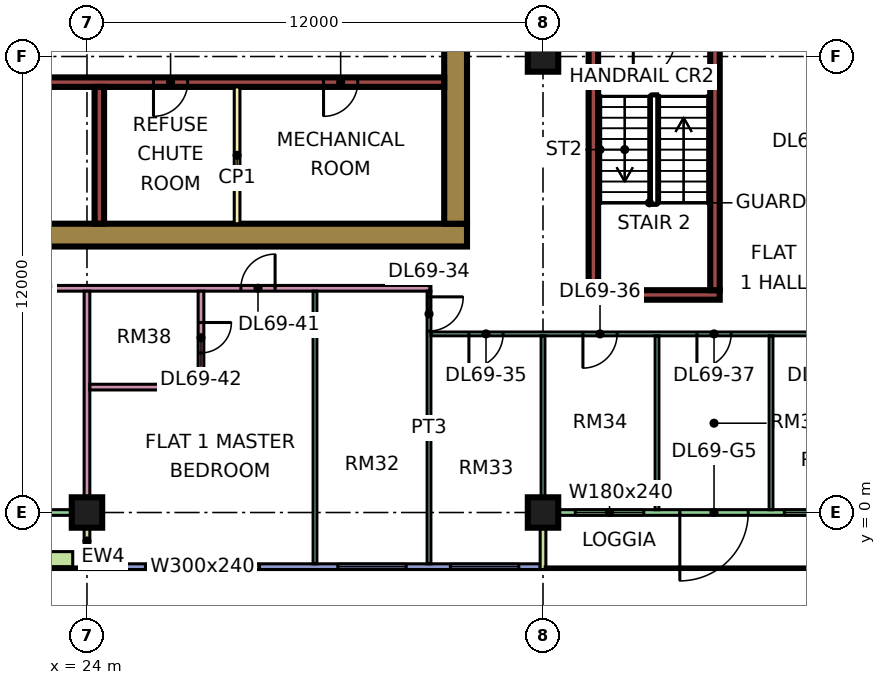
"""IFC4 building model, lengths in metres.
Left out: names, types, materials, properties, quantities, classifications, styles, units other than length and angle.
Written with IfcOpenShell. Run it as: python <this file> out.ifc"""

import sys

from ifc_helpers import new_model, si_unit, direction, frame, frame_2d, origin, origin_2d, place, context, subcontext, project, spatial, rectangle, extrude, element, fill, save


model = new_model("IFC4")
c1 = context("Model", 3, precision=1e-05, world=origin(), true_north=direction((0.0, 1.0)))
c2 = subcontext(c1, "Body", "Model", "MODEL_VIEW")
j1 = project(units=[si_unit("LENGTHUNIT", "METRE"), si_unit("PLANEANGLEUNIT", "RADIAN")], contexts=[c1])
p1 = place(None, origin())
s1 = spatial("IfcSite", under=j1, at=p1, CompositionType="ELEMENT")
p2 = place(p1, origin())
s2 = spatial("IfcBuilding", under=s1, at=p2, CompositionType="ELEMENT")
p3 = place(p2, frame((0.0, 0.0, 295.9)))
s3 = spatial("IfcBuildingStorey", under=s2, at=p3, CompositionType="ELEMENT", Elevation=295.9)
for number, where, z_axis, x_axis in (
    (1, (24.0, 0.0, 0.0), (0.0, 0.0, 1.0), (1.0, 0.0, 0.0)),
    (2, (36.0, 0.0, 0.0), (0.0, 0.0, 1.0), (1.0, 0.0, 0.0)),
    (3, (36.0, 12.0, 0.0), (0.0, 0.0, 1.0), (1.0, 0.0, 0.0)),
):
    element("IfcColumn", number, at=place(p3, frame(where, z_axis=z_axis, x_axis=x_axis)), inside=s3, PredefinedType="COLUMN", context=c2, shape_type="SweptSolid", body=[
        extrude(rectangle(XDim=0.8, YDim=0.8, at=origin_2d()), origin(), (0.0, 0.0, 1.0), 3.75),
    ])
p4 = place(p3, frame((9.0, 7.3, 0.0), z_axis=(0.0, 0.0, 1.0), x_axis=(1.0, 0.0, 0.0)))
e4 = element("IfcWall", 4, at=p4, inside=s3, PredefinedType="SHEAR", context=c2, shape_type="SweptSolid", body=[
    extrude(rectangle(XDim=25.0, YDim=0.6, at=frame_2d((12.5, 0.0))), origin(), (0.0, 0.0, 1.0), 3.75),
])
p5 = place(p3, frame((33.7, 7.6, 0.0), z_axis=(0.0, 0.0, 1.0), x_axis=(0.0, 1.0, 0.0)))
e5 = element("IfcWall", 5, at=p5, inside=s3, PredefinedType="SHEAR", context=c2, shape_type="SweptSolid", body=[
    extrude(rectangle(XDim=11.8, YDim=0.6, at=frame_2d((5.9, 0.0))), origin(), (0.0, 0.0, 1.0), 3.75),
])
p6 = place(p5, frame((5.6, 0.0, 0.0)))
e6 = element("IfcOpeningElement", 6, at=p6, cuts=e5, PredefinedType="OPENING", context=c2, shape_type="SweptSolid", body=[
    extrude(rectangle(XDim=1.8, YDim=2.4, at=frame_2d((0.9, 1.2))), frame((0.0, 0.31, 0.0), z_axis=(0.0, -1.0, 0.0), x_axis=(1.0, 0.0, 0.0)), (0.0, 0.0, 1.0), 0.62),
])
p7 = place(p3, frame((13.45, 11.325, 0.0), z_axis=(0.0, 0.0, 1.0), x_axis=(1.0, 0.0, 0.0)))
e7 = element("IfcWall", 7, at=p7, inside=s3, PredefinedType="SHEAR", context=c2, shape_type="SweptSolid", body=[
    extrude(rectangle(XDim=19.95, YDim=0.25, at=frame_2d((9.975, 0.0))), origin(), (0.0, 0.0, 1.0), 3.75),
])
p8 = place(p7, frame((4.925, 0.0, 0.0)))
e8 = element("IfcOpeningElement", 8, at=p8, cuts=e7, PredefinedType="OPENING", context=c2, shape_type="SweptSolid", body=[
    extrude(rectangle(XDim=0.9, YDim=2.1, at=frame_2d((0.45, 1.05))), frame((0.0, 0.135, 0.0), z_axis=(0.0, -1.0, 0.0), x_axis=(1.0, 0.0, 0.0)), (0.0, 0.0, 1.0), 0.27),
])
p9 = place(p7, frame((12.3, 0.0, 0.0)))
e9 = element("IfcOpeningElement", 9, at=p9, cuts=e7, PredefinedType="OPENING", context=c2, shape_type="SweptSolid", body=[
    extrude(rectangle(XDim=0.9, YDim=2.1, at=frame_2d((0.45, 1.05))), frame((0.0, 0.135, 0.0), z_axis=(0.0, -1.0, 0.0), x_axis=(1.0, 0.0, 0.0)), (0.0, 0.0, 1.0), 0.27),
])
p10 = place(p7, frame((16.775, 0.0, 0.0)))
e10 = element("IfcOpeningElement", 10, at=p10, cuts=e7, PredefinedType="OPENING", context=c2, shape_type="SweptSolid", body=[
    extrude(rectangle(XDim=0.9, YDim=2.1, at=frame_2d((0.45, 1.05))), frame((0.0, 0.135, 0.0), z_axis=(0.0, -1.0, 0.0), x_axis=(1.0, 0.0, 0.0)), (0.0, 0.0, 1.0), 0.27),
])
p11 = place(p3, frame((24.325, 7.6, 0.0), z_axis=(0.0, 0.0, 1.0), x_axis=(0.0, 1.0, 0.0)))
e11 = element("IfcWall", 11, at=p11, inside=s3, PredefinedType="SHEAR", context=c2, shape_type="SweptSolid", body=[
    extrude(rectangle(XDim=3.6, YDim=0.25, at=frame_2d((1.8, 0.0))), origin(), (0.0, 0.0, 1.0), 3.75),
])
p12 = place(p3, frame((37.2, 5.725, 0.0), z_axis=(0.0, 0.0, 1.0), x_axis=(1.0, 0.0, 0.0)))
e12 = element("IfcWall", 12, at=p12, inside=s3, PredefinedType="SHEAR", context=c2, shape_type="SweptSolid", body=[
    extrude(rectangle(XDim=3.45, YDim=0.25, at=frame_2d((1.725, 0.0))), origin(), (0.0, 0.0, 1.0), 3.75),
])
for number, where, z_axis, x_axis in (
    (13, (37.325, 5.85, 0.0), (0.0, 0.0, 1.0), (0.0, 1.0, 0.0)),
    (14, (40.525, 5.85, 0.0), (0.0, 0.0, 1.0), (0.0, 1.0, 0.0)),
):
    element("IfcWall", number, at=place(p3, frame(where, z_axis=z_axis, x_axis=x_axis)), inside=s3, PredefinedType="SHEAR", context=c2, shape_type="SweptSolid", body=[
        extrude(rectangle(XDim=6.5, YDim=0.25, at=frame_2d((3.25, 0.0))), origin(), (0.0, 0.0, 1.0), 3.75),
    ])
p13 = place(p3, frame((12.575, 0.0, 0.0), z_axis=(0.0, 0.0, 1.0), x_axis=(1.0, 0.0, 0.0)))
e15 = element("IfcWall", 15, at=p13, inside=s3, PredefinedType="SOLIDWALL", context=c2, shape_type="SweptSolid", body=[
    extrude(rectangle(XDim=11.35, YDim=0.15, at=frame_2d((5.675, 0.0))), origin(), (0.0, 0.0, 1.0), 3.35),
])
p14 = place(p13, frame((0.613, 0.0, 0.0)))
e16 = element("IfcOpeningElement", 16, at=p14, cuts=e15, PredefinedType="OPENING", context=c2, shape_type="SweptSolid", body=[
    extrude(rectangle(XDim=1.2, YDim=2.4, at=frame_2d((0.6, 1.2))), frame((0.0, 0.085, 0.0), z_axis=(0.0, -1.0, 0.0), x_axis=(1.0, 0.0, 0.0)), (0.0, 0.0, 1.0), 0.17),
])
p15 = place(p13, frame((5.175, 0.0, 0.45)))
e17 = element("IfcOpeningElement", 17, at=p15, cuts=e15, PredefinedType="OPENING", context=c2, shape_type="SweptSolid", body=[
    extrude(rectangle(XDim=3.0, YDim=2.4, at=frame_2d((1.5, 1.2))), frame((0.0, 0.085, 0.0), z_axis=(0.0, -1.0, 0.0), x_axis=(1.0, 0.0, 0.0)), (0.0, 0.0, 1.0), 0.17),
])
p16 = place(p3, frame((24.0, -1.5, 0.0), z_axis=(0.0, 0.0, 1.0), x_axis=(0.0, 1.0, 0.0)))
e18 = element("IfcWall", 18, at=p16, inside=s3, PredefinedType="SOLIDWALL", context=c2, shape_type="SweptSolid", body=[
    extrude(rectangle(XDim=1.5, YDim=0.15, at=frame_2d((0.75, 0.0))), origin(), (0.0, 0.0, 1.0), 3.35),
])
p17 = place(p3, frame((24.075, -1.425, 0.0), z_axis=(0.0, 0.0, 1.0), x_axis=(1.0, 0.0, 0.0)))
e19 = element("IfcWall", 19, at=p17, inside=s3, PredefinedType="SOLIDWALL", context=c2, shape_type="SweptSolid", body=[
    extrude(rectangle(XDim=11.85, YDim=0.15, at=frame_2d((5.925, 0.0))), origin(), (0.0, 0.0, 1.0), 3.35),
])
p18 = place(p17, frame((1.462, 0.0, 0.45)))
e20 = element("IfcOpeningElement", 20, at=p18, cuts=e19, PredefinedType="OPENING", context=c2, shape_type="SweptSolid", body=[
    extrude(rectangle(XDim=3.0, YDim=2.4, at=frame_2d((1.5, 1.2))), frame((0.0, 0.085, 0.0), z_axis=(0.0, -1.0, 0.0), x_axis=(1.0, 0.0, 0.0)), (0.0, 0.0, 1.0), 0.17),
])
p19 = place(p17, frame((6.525, 0.0, 0.45)))
e21 = element("IfcOpeningElement", 21, at=p19, cuts=e19, PredefinedType="OPENING", context=c2, shape_type="SweptSolid", body=[
    extrude(rectangle(XDim=1.8, YDim=2.4, at=frame_2d((0.9, 1.2))), frame((0.0, 0.085, 0.0), z_axis=(0.0, -1.0, 0.0), x_axis=(1.0, 0.0, 0.0)), (0.0, 0.0, 1.0), 0.17),
])
p20 = place(p17, frame((9.488, 0.0, 0.45)))
e22 = element("IfcOpeningElement", 22, at=p20, cuts=e19, PredefinedType="OPENING", context=c2, shape_type="SweptSolid", body=[
    extrude(rectangle(XDim=1.8, YDim=2.4, at=frame_2d((0.9, 1.2))), frame((0.0, 0.085, 0.0), z_axis=(0.0, -1.0, 0.0), x_axis=(1.0, 0.0, 0.0)), (0.0, 0.0, 1.0), 0.17),
])
p21 = place(p3, frame((36.075, 0.0, 0.0), z_axis=(0.0, 0.0, 1.0), x_axis=(1.0, 0.0, 0.0)))
e23 = element("IfcWall", 23, at=p21, inside=s3, PredefinedType="SOLIDWALL", context=c2, shape_type="SweptSolid", body=[
    extrude(rectangle(XDim=11.85, YDim=0.15, at=frame_2d((5.925, 0.0))), origin(), (0.0, 0.0, 1.0), 3.35),
])
p22 = place(p21, frame((0.775, 0.0, 0.45)))
e24 = element("IfcOpeningElement", 24, at=p22, cuts=e23, PredefinedType="OPENING", context=c2, shape_type="SweptSolid", body=[
    extrude(rectangle(XDim=1.8, YDim=2.4, at=frame_2d((0.9, 1.2))), frame((0.0, 0.085, 0.0), z_axis=(0.0, -1.0, 0.0), x_axis=(1.0, 0.0, 0.0)), (0.0, 0.0, 1.0), 0.17),
])
p23 = place(p21, frame((3.525, 0.0, 0.0)))
e25 = element("IfcOpeningElement", 25, at=p23, cuts=e23, PredefinedType="OPENING", context=c2, shape_type="SweptSolid", body=[
    extrude(rectangle(XDim=1.8, YDim=2.4, at=frame_2d((0.9, 1.2))), frame((0.0, 0.085, 0.0), z_axis=(0.0, -1.0, 0.0), x_axis=(1.0, 0.0, 0.0)), (0.0, 0.0, 1.0), 0.17),
])
p24 = place(p21, frame((6.275, 0.0, 0.45)))
e26 = element("IfcOpeningElement", 26, at=p24, cuts=e23, PredefinedType="OPENING", context=c2, shape_type="SweptSolid", body=[
    extrude(rectangle(XDim=1.8, YDim=2.4, at=frame_2d((0.9, 1.2))), frame((0.0, 0.085, 0.0), z_axis=(0.0, -1.0, 0.0), x_axis=(1.0, 0.0, 0.0)), (0.0, 0.0, 1.0), 0.17),
])
p25 = place(p21, frame((10.038, 0.0, 0.45)))
e27 = element("IfcOpeningElement", 27, at=p25, cuts=e23, PredefinedType="OPENING", context=c2, shape_type="SweptSolid", body=[
    extrude(rectangle(XDim=1.2, YDim=2.4, at=frame_2d((0.6, 1.2))), frame((0.0, 0.085, 0.0), z_axis=(0.0, -1.0, 0.0), x_axis=(1.0, 0.0, 0.0)), (0.0, 0.0, 1.0), 0.17),
])
p26 = place(p3, frame((36.0, -1.5, 0.0), z_axis=(0.0, 0.0, 1.0), x_axis=(0.0, 1.0, 0.0)))
e28 = element("IfcWall", 28, at=p26, inside=s3, PredefinedType="SOLIDWALL", context=c2, shape_type="SweptSolid", body=[
    extrude(rectangle(XDim=1.5, YDim=0.15, at=frame_2d((0.75, 0.0))), origin(), (0.0, 0.0, 1.0), 3.35),
])
p27 = place(p3, frame((12.875, -1.229, 0.0), z_axis=(0.0, 0.0, 1.0), x_axis=(1.0, 0.0, 0.0)))
e29 = element("IfcWall", 29, at=p27, inside=s3, PredefinedType="SOLIDWALL", context=c2, shape_type="SweptSolid", body=[
    extrude(rectangle(XDim=10.75, YDim=0.4, at=frame_2d((5.375, 0.0))), origin(), (0.0, 0.0, 1.0), 0.7),
])
p28 = place(p3, frame((27.95, 7.6, 0.0), z_axis=(0.0, 0.0, 1.0), x_axis=(0.0, 1.0, 0.0)))
e30 = element("IfcWall", 30, at=p28, inside=s3, PredefinedType="PARTITIONING", context=c2, shape_type="SweptSolid", body=[
    extrude(rectangle(XDim=3.6, YDim=0.15, at=frame_2d((1.8, 0.0))), origin(), (0.0, 0.0, 1.0), 3.35),
])
p29 = place(p3, frame((11.95, 5.9, 0.0), z_axis=(0.0, 0.0, 1.0), x_axis=(1.0, 0.0, 0.0)))
e31 = element("IfcWall", 31, at=p29, inside=s3, PredefinedType="PARTITIONING", context=c2, shape_type="SweptSolid", body=[
    extrude(rectangle(XDim=21.1, YDim=0.15, at=frame_2d((10.55, 0.0))), origin(), (0.0, 0.0, 1.0), 3.35),
])
p30 = place(p29, frame((1.1, 0.0, 0.0)))
e32 = element("IfcOpeningElement", 32, at=p30, cuts=e31, PredefinedType="OPENING", context=c2, shape_type="SweptSolid", body=[
    extrude(rectangle(XDim=0.9, YDim=2.1, at=frame_2d((0.45, 1.05))), frame((0.0, 0.085, 0.0), z_axis=(0.0, -1.0, 0.0), x_axis=(1.0, 0.0, 0.0)), (0.0, 0.0, 1.0), 0.17),
])
p31 = place(p29, frame((16.1, 0.0, 0.0)))
e33 = element("IfcOpeningElement", 33, at=p31, cuts=e31, PredefinedType="OPENING", context=c2, shape_type="SweptSolid", body=[
    extrude(rectangle(XDim=0.9, YDim=2.1, at=frame_2d((0.45, 1.05))), frame((0.0, 0.085, 0.0), z_axis=(0.0, -1.0, 0.0), x_axis=(1.0, 0.0, 0.0)), (0.0, 0.0, 1.0), 0.17),
])
p32 = place(p29, frame((7.1, 0.0, 0.0)))
e34 = element("IfcOpeningElement", 34, at=p32, cuts=e31, PredefinedType="OPENING", context=c2, shape_type="SweptSolid", body=[
    extrude(rectangle(XDim=0.9, YDim=2.1, at=frame_2d((0.45, 1.05))), frame((0.0, 0.085, 0.0), z_axis=(0.0, -1.0, 0.0), x_axis=(1.0, 0.0, 0.0)), (0.0, 0.0, 1.0), 0.17),
])
p33 = place(p3, frame((24.0, 0.0, 0.0), z_axis=(0.0, 0.0, 1.0), x_axis=(0.0, 1.0, 0.0)))
e35 = element("IfcWall", 35, at=p33, inside=s3, PredefinedType="PARTITIONING", context=c2, shape_type="SweptSolid", body=[
    extrude(rectangle(XDim=5.825, YDim=0.15, at=frame_2d((2.913, 0.0))), origin(), (0.0, 0.0, 1.0), 3.35),
])
p34 = place(p3, frame((24.075, 3.3, 0.0), z_axis=(0.0, 0.0, 1.0), x_axis=(1.0, 0.0, 0.0)))
e36 = element("IfcWall", 36, at=p34, inside=s3, PredefinedType="PARTITIONING", context=c2, shape_type="SweptSolid", body=[
    extrude(rectangle(XDim=3.0, YDim=0.15, at=frame_2d((1.5, 0.0))), origin(), (0.0, 0.0, 1.0), 3.35),
])
p35 = place(p3, frame((27.0, 3.375, 0.0), z_axis=(0.0, 0.0, 1.0), x_axis=(0.0, 1.0, 0.0)))
e37 = element("IfcWall", 37, at=p35, inside=s3, PredefinedType="PARTITIONING", context=c2, shape_type="SweptSolid", body=[
    extrude(rectangle(XDim=2.45, YDim=0.15, at=frame_2d((1.225, 0.0))), origin(), (0.0, 0.0, 1.0), 3.35),
])
p36 = place(p35, frame((0.825, 0.0, 0.0)))
e38 = element("IfcOpeningElement", 38, at=p36, cuts=e37, PredefinedType="OPENING", context=c2, shape_type="SweptSolid", body=[
    extrude(rectangle(XDim=0.8, YDim=2.1, at=frame_2d((0.4, 1.05))), frame((0.0, 0.085, 0.0), z_axis=(0.0, -1.0, 0.0), x_axis=(1.0, 0.0, 0.0)), (0.0, 0.0, 1.0), 0.17),
])
p37 = place(p3, frame((30.0, -1.351, 0.0), z_axis=(0.0, 0.0, 1.0), x_axis=(0.0, 1.0, 0.0)))
e39 = element("IfcWall", 39, at=p37, inside=s3, PredefinedType="PARTITIONING", context=c2, shape_type="SweptSolid", body=[
    extrude(rectangle(XDim=7.176, YDim=0.1, at=frame_2d((3.588, 0.0))), origin(), (0.0, 0.0, 1.0), 3.35),
])
p38 = place(p3, frame((33.0, -1.351, 0.0), z_axis=(0.0, 0.0, 1.0), x_axis=(0.0, 1.0, 0.0)))
e40 = element("IfcWall", 40, at=p38, inside=s3, PredefinedType="PARTITIONING", context=c2, shape_type="SweptSolid", body=[
    extrude(rectangle(XDim=7.176, YDim=0.1, at=frame_2d((3.588, 0.0))), origin(), (0.0, 0.0, 1.0), 3.35),
])
p39 = place(p38, frame((6.126, 0.0, 0.0)))
e41 = element("IfcOpeningElement", 41, at=p39, cuts=e40, PredefinedType="OPENING", context=c2, shape_type="SweptSolid", body=[
    extrude(rectangle(XDim=0.9, YDim=2.1, at=frame_2d((0.45, 1.05))), frame((0.0, 0.06, 0.0), z_axis=(0.0, -1.0, 0.0), x_axis=(1.0, 0.0, 0.0)), (0.0, 0.0, 1.0), 0.12),
])
p40 = place(p3, frame((33.05, 4.7, 0.0), z_axis=(0.0, 0.0, 1.0), x_axis=(1.0, 0.0, 0.0)))
e42 = element("IfcWall", 42, at=p40, inside=s3, PredefinedType="PARTITIONING", context=c2, shape_type="SweptSolid", body=[
    extrude(rectangle(XDim=20.85, YDim=0.1, at=frame_2d((10.425, 0.0))), origin(), (0.0, 0.0, 1.0), 3.35),
])
p41 = place(p40, frame((1.0, 0.0, 0.0)))
e43 = element("IfcOpeningElement", 43, at=p41, cuts=e42, PredefinedType="OPENING", context=c2, shape_type="SweptSolid", body=[
    extrude(rectangle(XDim=0.9, YDim=2.1, at=frame_2d((0.45, 1.05))), frame((0.0, 0.06, 0.0), z_axis=(0.0, -1.0, 0.0), x_axis=(1.0, 0.0, 0.0)), (0.0, 0.0, 1.0), 0.12),
])
p42 = place(p40, frame((4.0, 0.0, 0.0)))
e44 = element("IfcOpeningElement", 44, at=p42, cuts=e42, PredefinedType="OPENING", context=c2, shape_type="SweptSolid", body=[
    extrude(rectangle(XDim=0.9, YDim=2.1, at=frame_2d((0.45, 1.05))), frame((0.0, 0.06, 0.0), z_axis=(0.0, -1.0, 0.0), x_axis=(1.0, 0.0, 0.0)), (0.0, 0.0, 1.0), 0.12),
])
p43 = place(p40, frame((7.0, 0.0, 0.0)))
e45 = element("IfcOpeningElement", 45, at=p43, cuts=e42, PredefinedType="OPENING", context=c2, shape_type="SweptSolid", body=[
    extrude(rectangle(XDim=0.9, YDim=2.1, at=frame_2d((0.45, 1.05))), frame((0.0, 0.06, 0.0), z_axis=(0.0, -1.0, 0.0), x_axis=(1.0, 0.0, 0.0)), (0.0, 0.0, 1.0), 0.12),
])
p44 = place(p40, frame((10.0, 0.0, 0.0)))
e46 = element("IfcOpeningElement", 46, at=p44, cuts=e42, PredefinedType="OPENING", context=c2, shape_type="SweptSolid", body=[
    extrude(rectangle(XDim=0.9, YDim=2.1, at=frame_2d((0.45, 1.05))), frame((0.0, 0.06, 0.0), z_axis=(0.0, -1.0, 0.0), x_axis=(1.0, 0.0, 0.0)), (0.0, 0.0, 1.0), 0.12),
])
p45 = place(p40, frame((16.0, 0.0, 0.0)))
e47 = element("IfcOpeningElement", 47, at=p45, cuts=e42, PredefinedType="OPENING", context=c2, shape_type="SweptSolid", body=[
    extrude(rectangle(XDim=0.9, YDim=2.1, at=frame_2d((0.45, 1.05))), frame((0.0, 0.06, 0.0), z_axis=(0.0, -1.0, 0.0), x_axis=(1.0, 0.0, 0.0)), (0.0, 0.0, 1.0), 0.12),
])
p46 = place(p3, frame((36.0, 0.0, 0.0), z_axis=(0.0, 0.0, 1.0), x_axis=(0.0, 1.0, 0.0)))
e48 = element("IfcWall", 48, at=p46, inside=s3, PredefinedType="PARTITIONING", context=c2, shape_type="SweptSolid", body=[
    extrude(rectangle(XDim=4.65, YDim=0.1, at=frame_2d((2.325, 0.0))), origin(), (0.0, 0.0, 1.0), 3.35),
])
for number, where, z_axis, x_axis in (
    (49, (39.0, 0.074, 0.0), (0.0, 0.0, 1.0), (0.0, 1.0, 0.0)),
    (50, (42.0, 0.074, 0.0), (0.0, 0.0, 1.0), (0.0, 1.0, 0.0)),
):
    element("IfcWall", number, at=place(p3, frame(where, z_axis=z_axis, x_axis=x_axis)), inside=s3, PredefinedType="PARTITIONING", context=c2, shape_type="SweptSolid", body=[
        extrude(rectangle(XDim=4.576, YDim=0.1, at=frame_2d((2.288, 0.0))), origin(), (0.0, 0.0, 1.0), 3.35),
    ])
p47 = place(p18, origin())
e51 = element("IfcWindow", 51, at=p47, inside=s3, PartitioningType="SINGLE_PANEL", PredefinedType="WINDOW", context=c2, shape_type="SweptSolid", body=[
    extrude(rectangle(XDim=3.0, YDim=2.4, at=frame_2d((1.5, 1.2))), frame((0.0, 0.03, 0.0), z_axis=(0.0, -1.0, 0.0), x_axis=(1.0, 0.0, 0.0)), (0.0, 0.0, 1.0), 0.06),
])
fill(e20, e51)
p48 = place(p19, origin())
e52 = element("IfcWindow", 52, at=p48, inside=s3, PartitioningType="SINGLE_PANEL", PredefinedType="WINDOW", context=c2, shape_type="SweptSolid", body=[
    extrude(rectangle(XDim=1.8, YDim=2.4, at=frame_2d((0.9, 1.2))), frame((0.0, 0.03, 0.0), z_axis=(0.0, -1.0, 0.0), x_axis=(1.0, 0.0, 0.0)), (0.0, 0.0, 1.0), 0.06),
])
fill(e21, e52)
p49 = place(p20, origin())
e53 = element("IfcWindow", 53, at=p49, inside=s3, PartitioningType="SINGLE_PANEL", PredefinedType="WINDOW", context=c2, shape_type="SweptSolid", body=[
    extrude(rectangle(XDim=1.8, YDim=2.4, at=frame_2d((0.9, 1.2))), frame((0.0, 0.03, 0.0), z_axis=(0.0, -1.0, 0.0), x_axis=(1.0, 0.0, 0.0)), (0.0, 0.0, 1.0), 0.06),
])
fill(e22, e53)
p50 = place(p22, origin())
e54 = element("IfcWindow", 54, at=p50, inside=s3, PartitioningType="SINGLE_PANEL", PredefinedType="WINDOW", context=c2, shape_type="SweptSolid", body=[
    extrude(rectangle(XDim=1.8, YDim=2.4, at=frame_2d((0.9, 1.2))), frame((0.0, 0.03, 0.0), z_axis=(0.0, -1.0, 0.0), x_axis=(1.0, 0.0, 0.0)), (0.0, 0.0, 1.0), 0.06),
])
fill(e24, e54)
p51 = place(p23, frame((1.8, 0.0, 0.0), z_axis=(0.0, 0.0, 1.0), x_axis=(-1.0, 0.0, 0.0)))
e55 = element("IfcDoor", 55, at=p51, inside=s3, OperationType="DOUBLE_DOOR_SINGLE_SWING", PredefinedType="DOOR", context=c2, shape_type="SweptSolid", body=[
    extrude(rectangle(XDim=1.8, YDim=2.4, at=frame_2d((0.9, 1.2))), frame((0.0, 0.025, 0.0), z_axis=(0.0, -1.0, 0.0), x_axis=(1.0, 0.0, 0.0)), (0.0, 0.0, 1.0), 0.05),
])
fill(e25, e55)
p52 = place(p24, origin())
e56 = element("IfcWindow", 56, at=p52, inside=s3, PartitioningType="SINGLE_PANEL", PredefinedType="WINDOW", context=c2, shape_type="SweptSolid", body=[
    extrude(rectangle(XDim=1.8, YDim=2.4, at=frame_2d((0.9, 1.2))), frame((0.0, 0.03, 0.0), z_axis=(0.0, -1.0, 0.0), x_axis=(1.0, 0.0, 0.0)), (0.0, 0.0, 1.0), 0.06),
])
fill(e26, e56)
p53 = place(p9, frame((0.9, 0.0, 0.0), z_axis=(0.0, 0.0, 1.0), x_axis=(-1.0, 0.0, 0.0)))
e57 = element("IfcDoor", 57, at=p53, inside=s3, OperationType="SINGLE_SWING_LEFT", PredefinedType="DOOR", context=c2, shape_type="SweptSolid", body=[
    extrude(rectangle(XDim=0.9, YDim=2.1, at=frame_2d((0.45, 1.05))), frame((0.0, 0.025, 0.0), z_axis=(0.0, -1.0, 0.0), x_axis=(1.0, 0.0, 0.0)), (0.0, 0.0, 1.0), 0.05),
])
fill(e9, e57)
p54 = place(p10, frame((0.9, 0.0, 0.0), z_axis=(0.0, 0.0, 1.0), x_axis=(-1.0, 0.0, 0.0)))
e58 = element("IfcDoor", 58, at=p54, inside=s3, OperationType="SINGLE_SWING_LEFT", PredefinedType="DOOR", context=c2, shape_type="SweptSolid", body=[
    extrude(rectangle(XDim=0.9, YDim=2.1, at=frame_2d((0.45, 1.05))), frame((0.0, 0.025, 0.0), z_axis=(0.0, -1.0, 0.0), x_axis=(1.0, 0.0, 0.0)), (0.0, 0.0, 1.0), 0.05),
])
fill(e10, e58)
p55 = place(p39, origin())
e59 = element("IfcDoor", 59, at=p55, inside=s3, OperationType="SINGLE_SWING_RIGHT", PredefinedType="DOOR", context=c2, shape_type="SweptSolid", body=[
    extrude(rectangle(XDim=0.9, YDim=2.1, at=frame_2d((0.45, 1.05))), frame((0.0, 0.025, 0.0), z_axis=(0.0, -1.0, 0.0), x_axis=(1.0, 0.0, 0.0)), (0.0, 0.0, 1.0), 0.05),
])
fill(e41, e59)
p56 = place(p41, frame((0.9, 0.0, 0.0), z_axis=(0.0, 0.0, 1.0), x_axis=(-1.0, 0.0, 0.0)))
e60 = element("IfcDoor", 60, at=p56, inside=s3, OperationType="SINGLE_SWING_LEFT", PredefinedType="DOOR", context=c2, shape_type="SweptSolid", body=[
    extrude(rectangle(XDim=0.9, YDim=2.1, at=frame_2d((0.45, 1.05))), frame((0.0, 0.025, 0.0), z_axis=(0.0, -1.0, 0.0), x_axis=(1.0, 0.0, 0.0)), (0.0, 0.0, 1.0), 0.05),
])
fill(e43, e60)
p57 = place(p42, frame((0.9, 0.0, 0.0), z_axis=(0.0, 0.0, 1.0), x_axis=(-1.0, 0.0, 0.0)))
e61 = element("IfcDoor", 61, at=p57, inside=s3, OperationType="SINGLE_SWING_LEFT", PredefinedType="DOOR", context=c2, shape_type="SweptSolid", body=[
    extrude(rectangle(XDim=0.9, YDim=2.1, at=frame_2d((0.45, 1.05))), frame((0.0, 0.025, 0.0), z_axis=(0.0, -1.0, 0.0), x_axis=(1.0, 0.0, 0.0)), (0.0, 0.0, 1.0), 0.05),
])
fill(e44, e61)
p58 = place(p43, frame((0.9, 0.0, 0.0), z_axis=(0.0, 0.0, 1.0), x_axis=(-1.0, 0.0, 0.0)))
e62 = element("IfcDoor", 62, at=p58, inside=s3, OperationType="SINGLE_SWING_LEFT", PredefinedType="DOOR", context=c2, shape_type="SweptSolid", body=[
    extrude(rectangle(XDim=0.9, YDim=2.1, at=frame_2d((0.45, 1.05))), frame((0.0, 0.025, 0.0), z_axis=(0.0, -1.0, 0.0), x_axis=(1.0, 0.0, 0.0)), (0.0, 0.0, 1.0), 0.05),
])
fill(e45, e62)
p59 = place(p31, frame((0.9, 0.0, 0.0), z_axis=(0.0, 0.0, 1.0), x_axis=(-1.0, 0.0, 0.0)))
e63 = element("IfcDoor", 63, at=p59, inside=s3, OperationType="SINGLE_SWING_RIGHT", PredefinedType="DOOR", context=c2, shape_type="SweptSolid", body=[
    extrude(rectangle(XDim=0.9, YDim=2.1, at=frame_2d((0.45, 1.05))), frame((0.0, 0.025, 0.0), z_axis=(0.0, -1.0, 0.0), x_axis=(1.0, 0.0, 0.0)), (0.0, 0.0, 1.0), 0.05),
])
fill(e33, e63)
p60 = place(p36, origin())
e64 = element("IfcDoor", 64, at=p60, inside=s3, OperationType="SINGLE_SWING_RIGHT", PredefinedType="DOOR", context=c2, shape_type="SweptSolid", body=[
    extrude(rectangle(XDim=0.8, YDim=2.1, at=frame_2d((0.4, 1.05))), frame((0.0, 0.025, 0.0), z_axis=(0.0, -1.0, 0.0), x_axis=(1.0, 0.0, 0.0)), (0.0, 0.0, 1.0), 0.05),
])
fill(e38, e64)
save(model, sys.argv[1])
